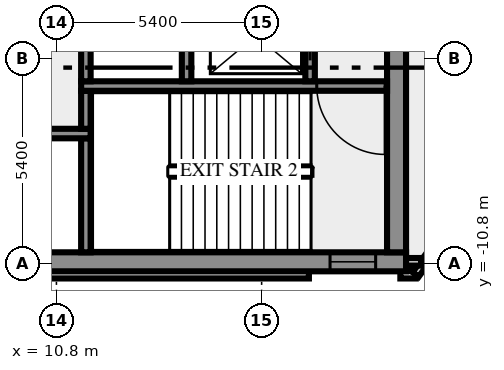
"""IFC4 building model, lengths in metres.
Left out: names, types, materials, properties, quantities, classifications, styles, units other than length and angle.
Written with IfcOpenShell. Run it as: python <this file> out.ifc"""

import sys

from ifc_helpers import new_model, si_unit, direction, frame, frame_2d, origin, place, context, subcontext, project, spatial, rectangle, extrude, element, fill, save


model = new_model("IFC4")
c1 = context("Model", 3, precision=1e-05, world=origin(), true_north=direction((0.0, 1.0)))
c2 = subcontext(c1, "Body", "Model", "MODEL_VIEW")
j1 = project(units=[si_unit("LENGTHUNIT", "METRE"), si_unit("PLANEANGLEUNIT", "RADIAN")], contexts=[c1])
p1 = place(None, origin())
s1 = spatial("IfcSite", under=j1, at=p1, CompositionType="ELEMENT")
p2 = place(p1, origin())
s2 = spatial("IfcBuilding", under=s1, at=p2, CompositionType="ELEMENT")
p3 = place(p2, frame((0.0, 0.0, 16.0)))
s3 = spatial("IfcBuildingStorey", under=s2, at=p3, CompositionType="ELEMENT", Elevation=16.0)
p4 = place(p3, frame((-17.444, -11.088, 0.0), z_axis=(0.0, 0.0, 1.0), x_axis=(1.0, 0.0, 0.0)))
e1 = element("IfcWall", 1, at=p4, inside=s3, PredefinedType="SOLIDWALL", context=c2, shape_type="SweptSolid", body=[
    extrude(rectangle(XDim=34.888, YDim=0.2, at=frame_2d((17.444, 0.0))), origin(), (0.0, 0.0, 1.0), 4.1),
])
p5 = place(p3, frame((19.85, -11.088, 0.0), z_axis=(0.0, 0.0, 1.0), x_axis=(1.0, 0.0, 0.0)))
e2 = element("IfcWall", 2, at=p5, inside=s3, PredefinedType="SOLIDWALL", context=c2, shape_type="SweptSolid", body=[
    extrude(rectangle(XDim=0.406, YDim=0.2, at=frame_2d((0.203, 0.0))), origin(), (0.0, 0.0, 1.0), 4.1),
])
p6 = place(p3, frame((20.253, -11.083, 0.0), z_axis=(0.0, 0.0, 1.0), x_axis=(0.587766567315, 0.809030569476, 0.0)))
e3 = element("IfcWall", 3, at=p6, inside=s3, PredefinedType="SOLIDWALL", context=c2, shape_type="SweptSolid", body=[
    extrude(rectangle(XDim=2.688, YDim=0.2, at=frame_2d((1.344, 0.0))), origin(), (0.0, 0.0, 1.0), 4.1),
])
p7 = place(p3, frame((19.98, -10.75, 0.0), z_axis=(0.0, 0.0, 1.0), x_axis=(1.0, 0.0, 0.0)))
e4 = element("IfcWall", 4, at=p7, inside=s3, PredefinedType="SOLIDWALL", context=c2, shape_type="SweptSolid", body=[
    extrude(rectangle(XDim=0.417, YDim=0.2, at=frame_2d((0.208, 0.0))), origin(), (0.0, 0.0, 1.0), 4.1),
])
p8 = place(p3, frame((-20.0, -10.75, 0.0), z_axis=(0.0, 0.0, 1.0), x_axis=(1.0, 0.0, 0.0)))
e5 = element("IfcWall", 5, at=p8, inside=s3, PredefinedType="SHEAR", context=c2, shape_type="SweptSolid", body=[
    extrude(rectangle(XDim=40.0, YDim=0.5, at=frame_2d((20.0, 0.0))), origin(), (0.0, 0.0, 1.0), 4.1),
])
p9 = place(p8, frame((0.8, 0.0, 1.0)))
e6 = element("IfcOpeningElement", 6, at=p9, cuts=e5, PredefinedType="OPENING", context=c2, shape_type="SweptSolid", body=[
    extrude(rectangle(XDim=1.2, YDim=1.2, at=frame_2d((0.6, 0.6))), frame((0.0, 0.26, 0.0), z_axis=(0.0, -1.0, 0.0), x_axis=(1.0, 0.0, 0.0)), (0.0, 0.0, 1.0), 0.52),
])
p10 = place(p8, frame((38.0, 0.0, 1.0)))
e7 = element("IfcOpeningElement", 7, at=p10, cuts=e5, PredefinedType="OPENING", context=c2, shape_type="SweptSolid", body=[
    extrude(rectangle(XDim=1.2, YDim=1.2, at=frame_2d((0.6, 0.6))), frame((0.0, 0.26, 0.0), z_axis=(0.0, -1.0, 0.0), x_axis=(1.0, 0.0, 0.0)), (0.0, 0.0, 1.0), 0.52),
])
p11 = place(p3, frame((11.575, -10.5, 0.0), z_axis=(0.0, 0.0, 1.0), x_axis=(0.0, 1.0, 0.0)))
e8 = element("IfcWall", 8, at=p11, inside=s3, PredefinedType="SHEAR", context=c2, shape_type="SweptSolid", body=[
    extrude(rectangle(XDim=3.0, YDim=0.25, at=frame_2d((1.5, 0.0))), origin(), (0.0, 0.0, 1.0), 4.1),
])
p12 = place(p3, frame((19.75, -10.5, 0.0), z_axis=(0.0, 0.0, 1.0), x_axis=(0.0, 1.0, 0.0)))
e9 = element("IfcWall", 9, at=p12, inside=s3, PredefinedType="SHEAR", context=c2, shape_type="SweptSolid", body=[
    extrude(rectangle(XDim=8.8, YDim=0.5, at=frame_2d((4.4, 0.0))), origin(), (0.0, 0.0, 1.0), 4.1),
])
p13 = place(p3, frame((11.7, -7.375, 0.0), z_axis=(0.0, 0.0, 1.0), x_axis=(-1.0, 0.0, 0.0)))
e10 = element("IfcWall", 10, at=p13, inside=s3, PredefinedType="SHEAR", context=c2, shape_type="SweptSolid", body=[
    extrude(rectangle(XDim=23.4, YDim=0.25, at=frame_2d((11.7, 0.0))), origin(), (0.0, 0.0, 1.0), 4.1),
])
p14 = place(p13, frame((21.45, 0.0, 0.0)))
e11 = element("IfcOpeningElement", 11, at=p14, cuts=e10, PredefinedType="OPENING", context=c2, shape_type="SweptSolid", body=[
    extrude(rectangle(XDim=1.1, YDim=2.1, at=frame_2d((0.55, 1.05))), frame((0.0, 0.135, 0.0), z_axis=(0.0, -1.0, 0.0), x_axis=(1.0, 0.0, 0.0)), (0.0, 0.0, 1.0), 0.27),
])
p15 = place(p13, frame((18.95, 0.0, 0.0)))
e12 = element("IfcOpeningElement", 12, at=p15, cuts=e10, PredefinedType="OPENING", context=c2, shape_type="SweptSolid", body=[
    extrude(rectangle(XDim=1.1, YDim=2.1, at=frame_2d((0.55, 1.05))), frame((0.0, 0.135, 0.0), z_axis=(0.0, -1.0, 0.0), x_axis=(1.0, 0.0, 0.0)), (0.0, 0.0, 1.0), 0.27),
])
p16 = place(p13, frame((16.45, 0.0, 0.0)))
e13 = element("IfcOpeningElement", 13, at=p16, cuts=e10, PredefinedType="OPENING", context=c2, shape_type="SweptSolid", body=[
    extrude(rectangle(XDim=1.1, YDim=2.1, at=frame_2d((0.55, 1.05))), frame((0.0, 0.135, 0.0), z_axis=(0.0, -1.0, 0.0), x_axis=(1.0, 0.0, 0.0)), (0.0, 0.0, 1.0), 0.27),
])
p17 = place(p13, frame((14.75, 0.0, 0.0)))
e14 = element("IfcOpeningElement", 14, at=p17, cuts=e10, PredefinedType="OPENING", context=c2, shape_type="SweptSolid", body=[
    extrude(rectangle(XDim=0.7, YDim=2.1, at=frame_2d((0.35, 1.05))), frame((0.0, 0.135, 0.0), z_axis=(0.0, -1.0, 0.0), x_axis=(1.0, 0.0, 0.0)), (0.0, 0.0, 1.0), 0.27),
])
p18 = place(p13, frame((13.35, 0.0, 0.0)))
e15 = element("IfcOpeningElement", 15, at=p18, cuts=e10, PredefinedType="OPENING", context=c2, shape_type="SweptSolid", body=[
    extrude(rectangle(XDim=0.9, YDim=2.1, at=frame_2d((0.45, 1.05))), frame((0.0, 0.135, 0.0), z_axis=(0.0, -1.0, 0.0), x_axis=(1.0, 0.0, 0.0)), (0.0, 0.0, 1.0), 0.27),
])
p19 = place(p13, frame((11.975, 0.0, 0.0)))
e16 = element("IfcOpeningElement", 16, at=p19, cuts=e10, PredefinedType="OPENING", context=c2, shape_type="SweptSolid", body=[
    extrude(rectangle(XDim=0.9, YDim=2.1, at=frame_2d((0.45, 1.05))), frame((0.0, 0.135, 0.0), z_axis=(0.0, -1.0, 0.0), x_axis=(1.0, 0.0, 0.0)), (0.0, 0.0, 1.0), 0.27),
])
p20 = place(p13, frame((10.5, 0.0, 0.0)))
e17 = element("IfcOpeningElement", 17, at=p20, cuts=e10, PredefinedType="OPENING", context=c2, shape_type="SweptSolid", body=[
    extrude(rectangle(XDim=0.9, YDim=2.1, at=frame_2d((0.45, 1.05))), frame((0.0, 0.135, 0.0), z_axis=(0.0, -1.0, 0.0), x_axis=(1.0, 0.0, 0.0)), (0.0, 0.0, 1.0), 0.27),
])
p21 = place(p3, frame((11.575, -7.25, 0.0), z_axis=(0.0, 0.0, 1.0), x_axis=(0.0, 1.0, 0.0)))
e18 = element("IfcWall", 18, at=p21, inside=s3, PredefinedType="SHEAR", context=c2, shape_type="SweptSolid", body=[
    extrude(rectangle(XDim=1.0, YDim=0.25, at=frame_2d((0.5, 0.0))), origin(), (0.0, 0.0, 1.0), 4.1),
])
p22 = place(p3, frame((19.5, -6.125, 0.0), z_axis=(0.0, 0.0, 1.0), x_axis=(-1.0, 0.0, 0.0)))
e19 = element("IfcWall", 19, at=p22, inside=s3, PredefinedType="SHEAR", context=c2, shape_type="SweptSolid", body=[
    extrude(rectangle(XDim=8.05, YDim=0.25, at=frame_2d((4.025, 0.0))), origin(), (0.0, 0.0, 1.0), 4.1),
])
p23 = place(p22, frame((0.05, 0.0, 0.0)))
e20 = element("IfcOpeningElement", 20, at=p23, cuts=e19, PredefinedType="OPENING", context=c2, shape_type="SweptSolid", body=[
    extrude(rectangle(XDim=1.8, YDim=2.1, at=frame_2d((0.9, 1.05))), frame((0.0, 0.135, 0.0), z_axis=(0.0, -1.0, 0.0), x_axis=(1.0, 0.0, 0.0)), (0.0, 0.0, 1.0), 0.27),
])
for number, where, z_axis, x_axis in (
    (21, (11.575, -6.0, 0.0), (0.0, 0.0, 1.0), (0.0, 1.0, 0.0)),
    (22, (14.225, -6.0, 0.0), (0.0, 0.0, 1.0), (0.0, 1.0, 0.0)),
):
    element("IfcWall", number, at=place(p3, frame(where, z_axis=z_axis, x_axis=x_axis)), inside=s3, PredefinedType="SHEAR", context=c2, shape_type="SweptSolid", body=[
        extrude(rectangle(XDim=1.75, YDim=0.25, at=frame_2d((0.875, 0.0))), origin(), (0.0, 0.0, 1.0), 4.1),
    ])
p24 = place(p3, frame((17.475, -6.0, 0.0), z_axis=(0.0, 0.0, 1.0), x_axis=(0.0, 1.0, 0.0)))
e23 = element("IfcWall", 23, at=p24, inside=s3, PredefinedType="SHEAR", context=c2, shape_type="SweptSolid", body=[
    extrude(rectangle(XDim=4.3, YDim=0.25, at=frame_2d((2.15, 0.0))), origin(), (0.0, 0.0, 1.0), 4.1),
])
p25 = place(p24, frame((0.55, 0.0, 0.0)))
e24 = element("IfcOpeningElement", 24, at=p25, cuts=e23, PredefinedType="OPENING", context=c2, shape_type="SweptSolid", body=[
    extrude(rectangle(XDim=1.3, YDim=2.1, at=frame_2d((0.65, 1.05))), frame((0.0, 0.135, 0.0), z_axis=(0.0, -1.0, 0.0), x_axis=(1.0, 0.0, 0.0)), (0.0, 0.0, 1.0), 0.27),
])
p26 = place(p10, origin())
e25 = element("IfcWindow", 25, at=p26, inside=s3, PartitioningType="SINGLE_PANEL", PredefinedType="WINDOW", context=c2, shape_type="SweptSolid", body=[
    extrude(rectangle(XDim=1.2, YDim=1.2, at=frame_2d((0.6, 0.6))), frame((0.0, 0.03, 0.0), z_axis=(0.0, -1.0, 0.0), x_axis=(1.0, 0.0, 0.0)), (0.0, 0.0, 1.0), 0.06),
])
fill(e7, e25)
p27 = place(p23, origin())
e26 = element("IfcDoor", 26, at=p27, inside=s3, OperationType="DOUBLE_DOOR_SINGLE_SWING", PredefinedType="DOOR", context=c2, shape_type="SweptSolid", body=[
    extrude(rectangle(XDim=1.8, YDim=2.1, at=frame_2d((0.9, 1.05))), frame((0.0, 0.025, 0.0), z_axis=(0.0, -1.0, 0.0), x_axis=(1.0, 0.0, 0.0)), (0.0, 0.0, 1.0), 0.05),
])
fill(e20, e26)
p28 = place(p25, origin())
e27 = element("IfcDoor", 27, at=p28, inside=s3, OperationType="DOUBLE_DOOR_SLIDING", PredefinedType="DOOR", context=c2, shape_type="SweptSolid", body=[
    extrude(rectangle(XDim=1.3, YDim=2.1, at=frame_2d((0.65, 1.05))), frame((0.0, 0.025, 0.0), z_axis=(0.0, -1.0, 0.0), x_axis=(1.0, 0.0, 0.0)), (0.0, 0.0, 1.0), 0.05),
])
fill(e24, e27)
save(model, sys.argv[1])
